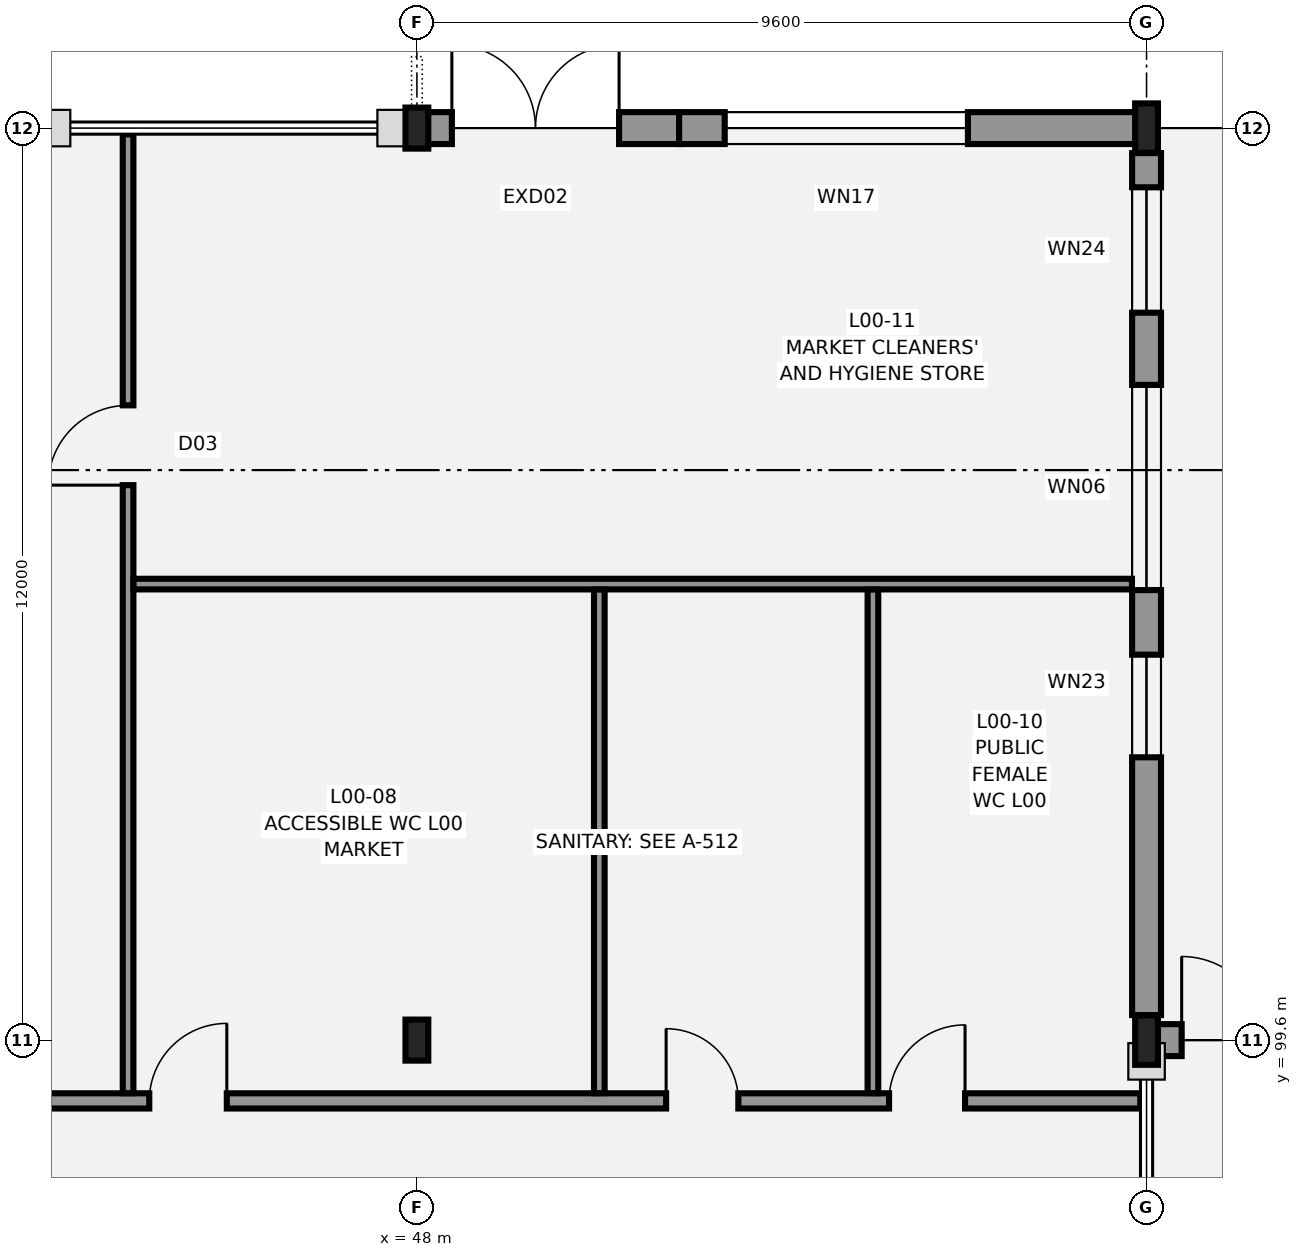
"""IFC4 building model, lengths in metres.
Left out: names, types, materials, properties, quantities, classifications, styles, units other than length and angle.
Written with IfcOpenShell. Run it as: python <this file> out.ifc"""

import sys

from ifc_helpers import new_model, si_unit, direction, frame, frame_2d, origin, origin_2d, place, context, subcontext, project, spatial, rectangle, i_section, extrude, element, fill, save


model = new_model("IFC4")
c1 = context("Model", 3, precision=1e-05, world=origin(), true_north=direction((0.0, 1.0)))
c2 = subcontext(c1, "Body", "Model", "MODEL_VIEW")
j1 = project(units=[si_unit("LENGTHUNIT", "METRE"), si_unit("PLANEANGLEUNIT", "RADIAN")], contexts=[c1])
p1 = place(None, origin())
s1 = spatial("IfcSite", under=j1, at=p1, CompositionType="ELEMENT")
p2 = place(p1, origin())
s2 = spatial("IfcBuilding", under=s1, at=p2, CompositionType="ELEMENT")
p3 = place(p2, origin())
s3 = spatial("IfcBuildingStorey", under=s2, at=p3, CompositionType="ELEMENT", Elevation=0.0)
for number, where, z_axis, x_axis in (
    (1, (48.0, 99.6, 0.0), (0.0, 0.0, 1.0), (1.0, 0.0, 0.0)),
    (2, (48.0, 111.6, 0.0), (0.0, 0.0, 1.0), (1.0, 0.0, 0.0)),
):
    element("IfcColumn", number, at=place(p3, frame(where, z_axis=z_axis, x_axis=x_axis)), inside=s3, PredefinedType="COLUMN", context=c2, shape_type="SweptSolid", body=[
        extrude(i_section(OverallWidth=0.3, OverallDepth=0.54, WebThickness=0.012, FlangeThickness=0.024, FilletRadius=0.027, at=origin_2d()), origin(), (0.0, 0.0, 1.0), 5.4),
    ])
for number, where, z_axis, x_axis in (
    (3, (57.6, 99.6, 0.0), (0.0, 0.0, 1.0), (1.0, 0.0, 0.0)),
    (4, (57.6, 111.6, 0.0), (0.0, 0.0, 1.0), (1.0, 0.0, 0.0)),
):
    element("IfcColumn", number, at=place(p3, frame(where, z_axis=z_axis, x_axis=x_axis)), inside=s3, PredefinedType="COLUMN", context=c2, shape_type="SweptSolid", body=[
        extrude(i_section(OverallWidth=0.3, OverallDepth=0.65, WebThickness=0.016, FlangeThickness=0.031, FilletRadius=0.027, at=origin_2d()), origin(), (0.0, 0.0, 1.0), 5.4),
    ])
p4 = place(p3, frame((48.01, 111.6, 0.0), z_axis=(0.0, 0.0, 1.0), x_axis=(1.0, 0.0, 0.0)))
e5 = element("IfcWall", 5, at=p4, inside=s3, PredefinedType="STANDARD", context=c2, shape_type="SweptSolid", body=[
    extrude(rectangle(XDim=3.44, YDim=0.42, at=frame_2d((1.72, 0.0))), origin(), (0.0, 0.0, 1.0), 4.665),
])
p5 = place(p4, frame((0.45, 0.0, 0.0)))
e6 = element("IfcOpeningElement", 6, at=p5, cuts=e5, PredefinedType="OPENING", context=c2, shape_type="SweptSolid", body=[
    extrude(rectangle(XDim=2.2, YDim=2.4, at=frame_2d((1.1, 1.2))), frame((0.0, 0.22, 0.0), z_axis=(0.0, -1.0, 0.0), x_axis=(1.0, 0.0, 0.0)), (0.0, 0.0, 1.0), 0.44),
])
p6 = place(p3, frame((51.45, 111.6, 0.0), z_axis=(0.0, 0.0, 1.0), x_axis=(1.0, 0.0, 0.0)))
e7 = element("IfcWall", 7, at=p6, inside=s3, PredefinedType="STANDARD", context=c2, shape_type="SweptSolid", body=[
    extrude(rectangle(XDim=6.138, YDim=0.42, at=frame_2d((3.069, 0.0))), origin(), (0.0, 0.0, 1.0), 4.665),
])
p7 = place(p6, frame((0.6, 0.0, 1.5)))
e8 = element("IfcOpeningElement", 8, at=p7, cuts=e7, PredefinedType="OPENING", context=c2, shape_type="SweptSolid", body=[
    extrude(rectangle(XDim=3.2, YDim=1.2, at=frame_2d((1.6, 0.6))), frame((0.0, 0.22, 0.0), z_axis=(0.0, -1.0, 0.0), x_axis=(1.0, 0.0, 0.0)), (0.0, 0.0, 1.0), 0.44),
])
p8 = place(p3, frame((57.6, 111.271, 0.0), z_axis=(0.0, 0.0, 1.0), x_axis=(0.0, -1.0, 0.0)))
e9 = element("IfcWall", 9, at=p8, inside=s3, PredefinedType="STANDARD", context=c2, shape_type="SweptSolid", body=[
    extrude(rectangle(XDim=11.342, YDim=0.38, at=frame_2d((5.671, 0.0))), origin(), (0.0, 0.0, 1.0), 4.7),
])
p9 = place(p8, frame((0.45, 0.0, 1.2)))
e10 = element("IfcOpeningElement", 10, at=p9, cuts=e9, PredefinedType="OPENING", context=c2, shape_type="SweptSolid", body=[
    extrude(rectangle(XDim=1.65, YDim=1.75, at=frame_2d((0.825, 0.875))), frame((0.0, 0.2, 0.0), z_axis=(0.0, -1.0, 0.0), x_axis=(1.0, 0.0, 0.0)), (0.0, 0.0, 1.0), 0.4),
])
p10 = place(p8, frame((3.05, 0.0, 1.2)))
e11 = element("IfcOpeningElement", 11, at=p10, cuts=e9, PredefinedType="OPENING", context=c2, shape_type="SweptSolid", body=[
    extrude(rectangle(XDim=2.7, YDim=1.8, at=frame_2d((1.35, 0.9))), frame((0.0, 0.2, 0.0), z_axis=(0.0, -1.0, 0.0), x_axis=(1.0, 0.0, 0.0)), (0.0, 0.0, 1.0), 0.4),
])
p11 = place(p8, frame((6.6, 0.0, 1.2)))
e12 = element("IfcOpeningElement", 12, at=p11, cuts=e9, PredefinedType="OPENING", context=c2, shape_type="SweptSolid", body=[
    extrude(rectangle(XDim=1.35, YDim=1.75, at=frame_2d((0.675, 0.875))), frame((0.0, 0.2, 0.0), z_axis=(0.0, -1.0, 0.0), x_axis=(1.0, 0.0, 0.0)), (0.0, 0.0, 1.0), 0.4),
])
p12 = place(p3, frame((57.612, 99.6, 0.0), z_axis=(0.0, 0.0, 1.0), x_axis=(1.0, 0.0, 0.0)))
e13 = element("IfcWall", 13, at=p12, inside=s3, PredefinedType="STANDARD", context=c2, shape_type="SweptSolid", body=[
    extrude(rectangle(XDim=3.588, YDim=0.42, at=frame_2d((1.794, 0.0))), origin(), (0.0, 0.0, 1.0), 4.665),
])
p13 = place(p12, frame((0.45, 0.0, 0.0)))
e14 = element("IfcOpeningElement", 14, at=p13, cuts=e13, PredefinedType="OPENING", context=c2, shape_type="SweptSolid", body=[
    extrude(rectangle(XDim=2.2, YDim=2.4, at=frame_2d((1.1, 1.2))), frame((0.0, 0.22, 0.0), z_axis=(0.0, -1.0, 0.0), x_axis=(1.0, 0.0, 0.0)), (0.0, 0.0, 1.0), 0.44),
])
p14 = place(p3, frame((0.212, 98.8, 0.0), z_axis=(0.0, 0.0, 1.0), x_axis=(1.0, 0.0, 0.0)))
e15 = element("IfcWall", 15, at=p14, inside=s3, PredefinedType="PARTITIONING", context=c2, shape_type="SweptSolid", body=[
    extrude(rectangle(XDim=57.306, YDim=0.2, at=frame_2d((28.653, 0.0))), origin(), (0.0, 0.0, 1.0), 5.04),
])
p15 = place(p14, frame((13.5, 0.0, 0.0)))
e16 = element("IfcOpeningElement", 16, at=p15, cuts=e15, PredefinedType="OPENING", context=c2, shape_type="SweptSolid", body=[
    extrude(rectangle(XDim=1.6, YDim=2.2, at=frame_2d((0.8, 1.1))), frame((0.0, 0.11, 0.0), z_axis=(0.0, -1.0, 0.0), x_axis=(1.0, 0.0, 0.0)), (0.0, 0.0, 1.0), 0.22),
])
p16 = place(p14, frame((33.333, 0.0, 0.0)))
e17 = element("IfcOpeningElement", 17, at=p16, cuts=e15, PredefinedType="OPENING", context=c2, shape_type="SweptSolid", body=[
    extrude(rectangle(XDim=1.6, YDim=2.2, at=frame_2d((0.8, 1.1))), frame((0.0, 0.11, 0.0), z_axis=(0.0, -1.0, 0.0), x_axis=(1.0, 0.0, 0.0)), (0.0, 0.0, 1.0), 0.22),
])
p17 = place(p14, frame((44.267, 0.0, 0.0)))
e18 = element("IfcOpeningElement", 18, at=p17, cuts=e15, PredefinedType="OPENING", context=c2, shape_type="SweptSolid", body=[
    extrude(rectangle(XDim=1.02, YDim=2.12, at=frame_2d((0.51, 1.06))), frame((0.0, 0.11, 0.0), z_axis=(0.0, -1.0, 0.0), x_axis=(1.0, 0.0, 0.0)), (0.0, 0.0, 1.0), 0.22),
])
p18 = place(p14, frame((51.067, 0.0, 0.0)))
e19 = element("IfcOpeningElement", 19, at=p18, cuts=e15, PredefinedType="OPENING", context=c2, shape_type="SweptSolid", body=[
    extrude(rectangle(XDim=0.95, YDim=2.1, at=frame_2d((0.475, 1.05))), frame((0.0, 0.11, 0.0), z_axis=(0.0, -1.0, 0.0), x_axis=(1.0, 0.0, 0.0)), (0.0, 0.0, 1.0), 0.22),
])
p19 = place(p14, frame((54.0, 0.0, 0.0)))
e20 = element("IfcOpeningElement", 20, at=p19, cuts=e15, PredefinedType="OPENING", context=c2, shape_type="SweptSolid", body=[
    extrude(rectangle(XDim=1.0, YDim=2.1, at=frame_2d((0.5, 1.05))), frame((0.0, 0.11, 0.0), z_axis=(0.0, -1.0, 0.0), x_axis=(1.0, 0.0, 0.0)), (0.0, 0.0, 1.0), 0.22),
])
p20 = place(p3, frame((44.2, 98.902, 0.0), z_axis=(0.0, 0.0, 1.0), x_axis=(0.0, 1.0, 0.0)))
e21 = element("IfcWall", 21, at=p20, inside=s3, PredefinedType="PARTITIONING", context=c2, shape_type="SweptSolid", body=[
    extrude(rectangle(XDim=12.616, YDim=0.14, at=frame_2d((6.308, 0.0))), origin(), (0.0, 0.0, 1.0), 5.04),
])
p21 = place(p20, frame((8.0, 0.0, 0.0)))
e22 = element("IfcOpeningElement", 22, at=p21, cuts=e21, PredefinedType="OPENING", context=c2, shape_type="SweptSolid", body=[
    extrude(rectangle(XDim=1.05, YDim=2.15, at=frame_2d((0.525, 1.075))), frame((0.0, 0.08, 0.0), z_axis=(0.0, -1.0, 0.0), x_axis=(1.0, 0.0, 0.0)), (0.0, 0.0, 1.0), 0.16),
])
p22 = place(p3, frame((44.272, 105.6, 0.0), z_axis=(0.0, 0.0, 1.0), x_axis=(1.0, 0.0, 0.0)))
e23 = element("IfcWall", 23, at=p22, inside=s3, PredefinedType="PARTITIONING", context=c2, shape_type="SweptSolid", body=[
    extrude(rectangle(XDim=13.136, YDim=0.14, at=frame_2d((6.568, 0.0))), origin(), (0.0, 0.0, 1.0), 5.04),
])
for number, where, z_axis, x_axis in (
    (24, (50.4, 98.902, 0.0), (0.0, 0.0, 1.0), (0.0, 1.0, 0.0)),
    (25, (54.0, 98.902, 0.0), (0.0, 0.0, 1.0), (0.0, 1.0, 0.0)),
):
    element("IfcWall", number, at=place(p3, frame(where, z_axis=z_axis, x_axis=x_axis)), inside=s3, PredefinedType="PARTITIONING", context=c2, shape_type="SweptSolid", body=[
        extrude(rectangle(XDim=6.626, YDim=0.14, at=frame_2d((3.313, 0.0))), origin(), (0.0, 0.0, 1.0), 5.04),
    ])
p23 = place(p5, origin())
e26 = element("IfcDoor", 26, at=p23, inside=s3, OperationType="DOUBLE_DOOR_SINGLE_SWING", PredefinedType="DOOR", context=c2, shape_type="SweptSolid", body=[
    extrude(rectangle(XDim=2.2, YDim=2.4, at=frame_2d((1.1, 1.2))), frame((0.0, 0.025, 0.0), z_axis=(0.0, -1.0, 0.0), x_axis=(1.0, 0.0, 0.0)), (0.0, 0.0, 1.0), 0.05),
])
fill(e6, e26)
p24 = place(p7, origin())
e27 = element("IfcWindow", 27, at=p24, inside=s3, PartitioningType="SINGLE_PANEL", PredefinedType="WINDOW", context=c2, shape_type="SweptSolid", body=[
    extrude(rectangle(XDim=3.2, YDim=1.2, at=frame_2d((1.6, 0.6))), frame((0.0, 0.03, 0.0), z_axis=(0.0, -1.0, 0.0), x_axis=(1.0, 0.0, 0.0)), (0.0, 0.0, 1.0), 0.06),
])
fill(e8, e27)
p25 = place(p9, origin())
e28 = element("IfcWindow", 28, at=p25, inside=s3, PartitioningType="SINGLE_PANEL", PredefinedType="WINDOW", context=c2, shape_type="SweptSolid", body=[
    extrude(rectangle(XDim=1.65, YDim=1.75, at=frame_2d((0.825, 0.875))), frame((0.0, 0.03, 0.0), z_axis=(0.0, -1.0, 0.0), x_axis=(1.0, 0.0, 0.0)), (0.0, 0.0, 1.0), 0.06),
])
fill(e10, e28)
p26 = place(p10, origin())
e29 = element("IfcWindow", 29, at=p26, inside=s3, PartitioningType="SINGLE_PANEL", PredefinedType="WINDOW", context=c2, shape_type="SweptSolid", body=[
    extrude(rectangle(XDim=2.7, YDim=1.8, at=frame_2d((1.35, 0.9))), frame((0.0, 0.03, 0.0), z_axis=(0.0, -1.0, 0.0), x_axis=(1.0, 0.0, 0.0)), (0.0, 0.0, 1.0), 0.06),
])
fill(e11, e29)
p27 = place(p11, origin())
e30 = element("IfcWindow", 30, at=p27, inside=s3, PartitioningType="SINGLE_PANEL", PredefinedType="WINDOW", context=c2, shape_type="SweptSolid", body=[
    extrude(rectangle(XDim=1.35, YDim=1.75, at=frame_2d((0.675, 0.875))), frame((0.0, 0.03, 0.0), z_axis=(0.0, -1.0, 0.0), x_axis=(1.0, 0.0, 0.0)), (0.0, 0.0, 1.0), 0.06),
])
fill(e12, e30)
p28 = place(p13, origin())
e31 = element("IfcDoor", 31, at=p28, inside=s3, OperationType="DOUBLE_DOOR_SINGLE_SWING", PredefinedType="DOOR", context=c2, shape_type="SweptSolid", body=[
    extrude(rectangle(XDim=2.2, YDim=2.4, at=frame_2d((1.1, 1.2))), frame((0.0, 0.025, 0.0), z_axis=(0.0, -1.0, 0.0), x_axis=(1.0, 0.0, 0.0)), (0.0, 0.0, 1.0), 0.05),
])
fill(e14, e31)
p29 = place(p17, origin())
e32 = element("IfcDoor", 32, at=p29, inside=s3, OperationType="SINGLE_SWING_RIGHT", PredefinedType="DOOR", context=c2, shape_type="SweptSolid", body=[
    extrude(rectangle(XDim=1.02, YDim=2.12, at=frame_2d((0.51, 1.06))), frame((0.0, 0.025, 0.0), z_axis=(0.0, -1.0, 0.0), x_axis=(1.0, 0.0, 0.0)), (0.0, 0.0, 1.0), 0.05),
])
fill(e18, e32)
p30 = place(p18, origin())
e33 = element("IfcDoor", 33, at=p30, inside=s3, OperationType="SINGLE_SWING_LEFT", PredefinedType="DOOR", context=c2, shape_type="SweptSolid", body=[
    extrude(rectangle(XDim=0.95, YDim=2.1, at=frame_2d((0.475, 1.05))), frame((0.0, 0.025, 0.0), z_axis=(0.0, -1.0, 0.0), x_axis=(1.0, 0.0, 0.0)), (0.0, 0.0, 1.0), 0.05),
])
fill(e19, e33)
p31 = place(p19, origin())
e34 = element("IfcDoor", 34, at=p31, inside=s3, OperationType="SINGLE_SWING_RIGHT", PredefinedType="DOOR", context=c2, shape_type="SweptSolid", body=[
    extrude(rectangle(XDim=1.0, YDim=2.1, at=frame_2d((0.5, 1.05))), frame((0.0, 0.025, 0.0), z_axis=(0.0, -1.0, 0.0), x_axis=(1.0, 0.0, 0.0)), (0.0, 0.0, 1.0), 0.05),
])
fill(e20, e34)
p32 = place(p21, origin())
e35 = element("IfcDoor", 35, at=p32, inside=s3, OperationType="SINGLE_SWING_LEFT", PredefinedType="DOOR", context=c2, shape_type="SweptSolid", body=[
    extrude(rectangle(XDim=1.05, YDim=2.15, at=frame_2d((0.525, 1.075))), frame((0.0, 0.025, 0.0), z_axis=(0.0, -1.0, 0.0), x_axis=(1.0, 0.0, 0.0)), (0.0, 0.0, 1.0), 0.05),
])
fill(e22, e35)
save(model, sys.argv[1])
